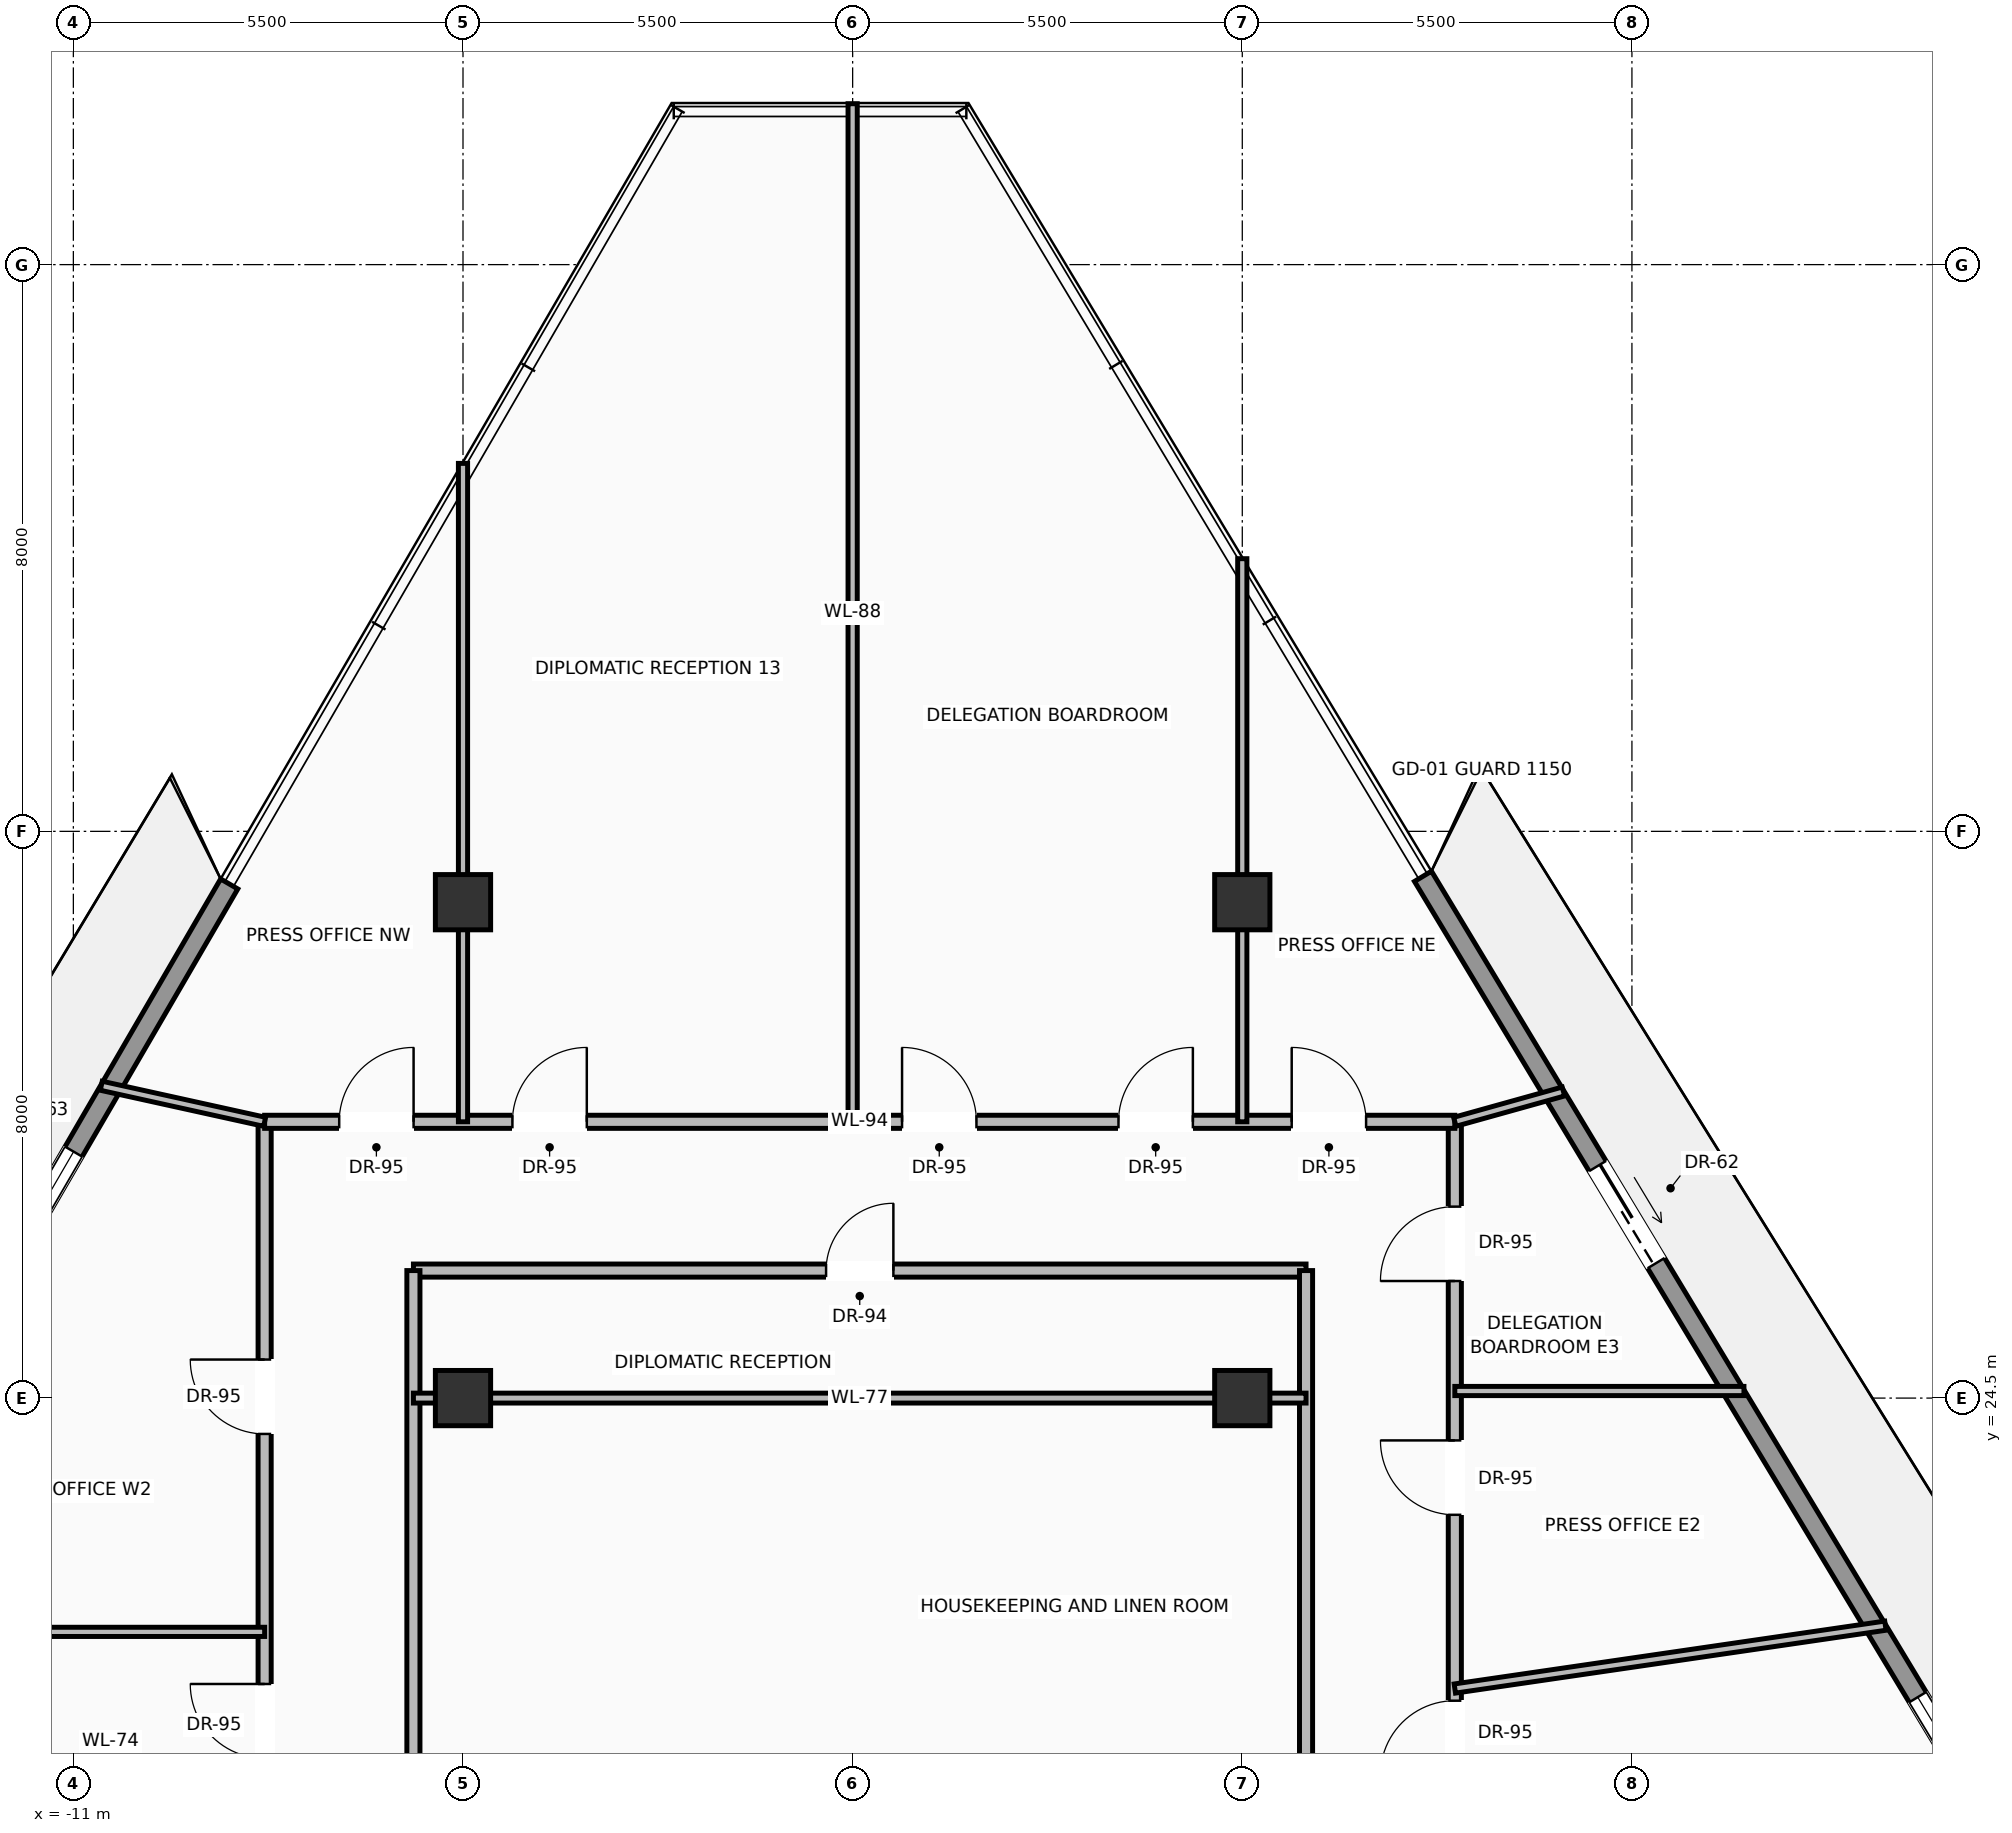
"""IFC4 building model, lengths in metres.
Left out: names, types, materials, properties, quantities, classifications, styles, units other than length and angle.
Written with IfcOpenShell. Run it as: python <this file> out.ifc"""

import sys

from ifc_helpers import new_model, si_unit, direction, frame, frame_2d, origin, origin_2d, place, context, subcontext, project, spatial, rectangle, extrude, source, transform, mapped, element, fill, save


model = new_model("IFC4")
c1 = context("Model", 3, precision=1e-05, world=origin(), true_north=direction((0.0, 1.0)))
c2 = subcontext(c1, "Body", "Model", "MODEL_VIEW")
j1 = project(units=[si_unit("LENGTHUNIT", "METRE"), si_unit("PLANEANGLEUNIT", "RADIAN")], contexts=[c1])
p1 = place(None, origin())
s1 = spatial("IfcSite", under=j1, at=p1, CompositionType="ELEMENT")
p2 = place(p1, origin())
s2 = spatial("IfcBuilding", under=s1, at=p2, CompositionType="ELEMENT")
p3 = place(p2, frame((0.0, 0.0, 262.65)))
s3 = spatial("IfcBuildingStorey", under=s2, at=p3, CompositionType="ELEMENT", Elevation=262.65)
m1 = source(origin(), c2, "Body", "SweptSolid", [
    extrude(rectangle(XDim=0.78, YDim=0.78, at=origin_2d()), origin(), (0.0, 0.0, 1.0), 3.45),
])
for number, where, z_axis, x_axis in (
    (1, (-5.5, 24.5, 0.0), (0.0, 0.0, 1.0), (1.0, 0.0, 0.0)),
    (2, (5.5, 24.5, 0.0), (0.0, 0.0, 1.0), (1.0, 0.0, 0.0)),
    (3, (-5.5, 31.5, 0.0), (0.0, 0.0, 1.0), (1.0, 0.0, 0.0)),
    (4, (5.5, 31.5, 0.0), (0.0, 0.0, 1.0), (1.0, 0.0, 0.0)),
):
    element("IfcColumn", number, at=place(p3, frame(where, z_axis=z_axis, x_axis=x_axis)), inside=s3, PredefinedType="COLUMN", context=c2, shape_type="MappedRepresentation", body=[
        mapped(m1, transform((0.0, 0.0, 0.0), scale=1.0)),
    ])
p4 = place(p3, frame((-18.804, 14.545, 0.0), z_axis=(0.0, 0.0, 1.0), x_axis=(0.502487235879, 0.864584627309, 0.0)))
e5 = element("IfcWall", 5, at=p4, inside=s3, PredefinedType="SOLIDWALL", context=c2, shape_type="SweptSolid", body=[
    extrude(rectangle(XDim=19.908, YDim=0.28, at=frame_2d((9.954, 0.0))), origin(), (0.0, 0.0, 1.0), 2.82),
])
p5 = place(p4, frame((4.778, 0.0, 0.0)))
e6 = element("IfcOpeningElement", 6, at=p5, cuts=e5, PredefinedType="OPENING", context=c2, shape_type="SweptSolid", body=[
    extrude(rectangle(XDim=1.6, YDim=2.35, at=frame_2d((0.8, 1.175))), frame((0.0, 0.15, 0.0), z_axis=(0.0, -1.0, 0.0), x_axis=(1.0, 0.0, 0.0)), (0.0, 0.0, 1.0), 0.3),
])
p6 = place(p4, frame((13.538, 0.0, 0.9)))
e7 = element("IfcOpeningElement", 7, at=p6, cuts=e5, PredefinedType="OPENING", context=c2, shape_type="SweptSolid", body=[
    extrude(rectangle(XDim=2.0, YDim=1.75, at=frame_2d((1.0, 0.875))), frame((0.0, 0.15, 0.0), z_axis=(0.0, -1.0, 0.0), x_axis=(1.0, 0.0, 0.0)), (0.0, 0.0, 1.0), 0.3),
])
p7 = place(p3, frame((8.051, 31.865, 0.0), z_axis=(0.0, 0.0, 1.0), x_axis=(0.516203649231, -0.856465873529, 0.0)))
e8 = element("IfcWall", 8, at=p7, inside=s3, PredefinedType="SOLIDWALL", context=c2, shape_type="SweptSolid", body=[
    extrude(rectangle(XDim=19.896, YDim=0.28, at=frame_2d((9.948, 0.0))), origin(), (0.0, 0.0, 1.0), 2.82),
])
p8 = place(p7, frame((4.775, 0.0, 0.0)))
e9 = element("IfcOpeningElement", 9, at=p8, cuts=e8, PredefinedType="OPENING", context=c2, shape_type="SweptSolid", body=[
    extrude(rectangle(XDim=1.6, YDim=2.35, at=frame_2d((0.8, 1.175))), frame((0.0, 0.15, 0.0), z_axis=(0.0, -1.0, 0.0), x_axis=(1.0, 0.0, 0.0)), (0.0, 0.0, 1.0), 0.3),
])
p9 = place(p7, frame((13.529, 0.0, 0.9)))
e10 = element("IfcOpeningElement", 10, at=p9, cuts=e8, PredefinedType="OPENING", context=c2, shape_type="SweptSolid", body=[
    extrude(rectangle(XDim=2.0, YDim=1.75, at=frame_2d((1.0, 0.875))), frame((0.0, 0.15, 0.0), z_axis=(0.0, -1.0, 0.0), x_axis=(1.0, 0.0, 0.0)), (0.0, 0.0, 1.0), 0.3),
])
p10 = place(p3, frame((-6.2, 26.3, 0.0), z_axis=(0.0, 0.0, 1.0), x_axis=(1.0, 0.0, 0.0)))
e11 = element("IfcWall", 11, at=p10, inside=s3, PredefinedType="PARTITIONING", context=c2, shape_type="SweptSolid", body=[
    extrude(rectangle(XDim=12.6, YDim=0.185, at=frame_2d((6.3, 0.0))), origin(), (0.0, 0.0, 1.0), 3.232),
])
p11 = place(p10, frame((5.825, 0.0, 0.0)))
e12 = element("IfcOpeningElement", 12, at=p11, cuts=e11, PredefinedType="OPENING", context=c2, shape_type="SweptSolid", body=[
    extrude(rectangle(XDim=0.95, YDim=2.2, at=frame_2d((0.475, 1.1))), frame((0.0, 0.103, 0.0), z_axis=(0.0, -1.0, 0.0), x_axis=(1.0, 0.0, 0.0)), (0.0, 0.0, 1.0), 0.205),
])
for number, where, z_axis, x_axis in (
    (13, (-6.2, 18.4, 0.0), (0.0, 0.0, 1.0), (0.0, 1.0, 0.0)),
    (14, (6.4, 18.4, 0.0), (0.0, 0.0, 1.0), (0.0, 1.0, 0.0)),
):
    element("IfcWall", number, at=place(p3, frame(where, z_axis=z_axis, x_axis=x_axis)), inside=s3, PredefinedType="PARTITIONING", context=c2, shape_type="SweptSolid", body=[
        extrude(rectangle(XDim=7.9, YDim=0.185, at=frame_2d((3.95, 0.0))), origin(), (0.0, 0.0, 1.0), 3.232),
    ])
p12 = place(p3, frame((-8.3, 16.2, 0.0), z_axis=(0.0, 0.0, 1.0), x_axis=(0.0, 1.0, 0.0)))
e15 = element("IfcWall", 15, at=p12, inside=s3, PredefinedType="PARTITIONING", context=c2, shape_type="SweptSolid", body=[
    extrude(rectangle(XDim=12.2, YDim=0.185, at=frame_2d((6.1, 0.0))), origin(), (0.0, 0.0, 1.0), 3.232),
])
p13 = place(p12, frame((3.214, 0.0, 0.0)))
e16 = element("IfcOpeningElement", 16, at=p13, cuts=e15, PredefinedType="OPENING", context=c2, shape_type="SweptSolid", body=[
    extrude(rectangle(XDim=1.05, YDim=2.25, at=frame_2d((0.525, 1.125))), frame((0.0, 0.103, 0.0), z_axis=(0.0, -1.0, 0.0), x_axis=(1.0, 0.0, 0.0)), (0.0, 0.0, 1.0), 0.205),
])
p14 = place(p12, frame((7.794, 0.0, 0.0)))
e17 = element("IfcOpeningElement", 17, at=p14, cuts=e15, PredefinedType="OPENING", context=c2, shape_type="SweptSolid", body=[
    extrude(rectangle(XDim=1.05, YDim=2.25, at=frame_2d((0.525, 1.125))), frame((0.0, 0.103, 0.0), z_axis=(0.0, -1.0, 0.0), x_axis=(1.0, 0.0, 0.0)), (0.0, 0.0, 1.0), 0.205),
])
p15 = place(p3, frame((8.5, 16.2, 0.0), z_axis=(0.0, 0.0, 1.0), x_axis=(0.0, 1.0, 0.0)))
e18 = element("IfcWall", 18, at=p15, inside=s3, PredefinedType="PARTITIONING", context=c2, shape_type="SweptSolid", body=[
    extrude(rectangle(XDim=12.2, YDim=0.185, at=frame_2d((6.1, 0.0))), origin(), (0.0, 0.0, 1.0), 3.232),
])
p16 = place(p15, frame((2.978, 0.0, 0.0)))
e19 = element("IfcOpeningElement", 19, at=p16, cuts=e18, PredefinedType="OPENING", context=c2, shape_type="SweptSolid", body=[
    extrude(rectangle(XDim=1.05, YDim=2.25, at=frame_2d((0.525, 1.125))), frame((0.0, 0.103, 0.0), z_axis=(0.0, -1.0, 0.0), x_axis=(1.0, 0.0, 0.0)), (0.0, 0.0, 1.0), 0.205),
])
p17 = place(p15, frame((6.653, 0.0, 0.0)))
e20 = element("IfcOpeningElement", 20, at=p17, cuts=e18, PredefinedType="OPENING", context=c2, shape_type="SweptSolid", body=[
    extrude(rectangle(XDim=1.05, YDim=2.25, at=frame_2d((0.525, 1.125))), frame((0.0, 0.103, 0.0), z_axis=(0.0, -1.0, 0.0), x_axis=(1.0, 0.0, 0.0)), (0.0, 0.0, 1.0), 0.205),
])
p18 = place(p15, frame((9.953, 0.0, 0.0)))
e21 = element("IfcOpeningElement", 21, at=p18, cuts=e18, PredefinedType="OPENING", context=c2, shape_type="SweptSolid", body=[
    extrude(rectangle(XDim=1.05, YDim=2.25, at=frame_2d((0.525, 1.125))), frame((0.0, 0.103, 0.0), z_axis=(0.0, -1.0, 0.0), x_axis=(1.0, 0.0, 0.0)), (0.0, 0.0, 1.0), 0.205),
])
p19 = place(p3, frame((-8.3, 28.4, 0.0), z_axis=(0.0, 0.0, 1.0), x_axis=(1.0, 0.0, 0.0)))
e22 = element("IfcWall", 22, at=p19, inside=s3, PredefinedType="PARTITIONING", context=c2, shape_type="SweptSolid", body=[
    extrude(rectangle(XDim=16.8, YDim=0.185, at=frame_2d((8.4, 0.0))), origin(), (0.0, 0.0, 1.0), 3.232),
])
p20 = place(p19, frame((3.498, 0.0, 0.0)))
e23 = element("IfcOpeningElement", 23, at=p20, cuts=e22, PredefinedType="OPENING", context=c2, shape_type="SweptSolid", body=[
    extrude(rectangle(XDim=1.05, YDim=2.25, at=frame_2d((0.525, 1.125))), frame((0.0, 0.103, 0.0), z_axis=(0.0, -1.0, 0.0), x_axis=(1.0, 0.0, 0.0)), (0.0, 0.0, 1.0), 0.205),
])
p21 = place(p19, frame((8.998, 0.0, 0.0)))
e24 = element("IfcOpeningElement", 24, at=p21, cuts=e22, PredefinedType="OPENING", context=c2, shape_type="SweptSolid", body=[
    extrude(rectangle(XDim=1.05, YDim=2.25, at=frame_2d((0.525, 1.125))), frame((0.0, 0.103, 0.0), z_axis=(0.0, -1.0, 0.0), x_axis=(1.0, 0.0, 0.0)), (0.0, 0.0, 1.0), 0.205),
])
p22 = place(p19, frame((12.052, 0.0, 0.0)))
e25 = element("IfcOpeningElement", 25, at=p22, cuts=e22, PredefinedType="OPENING", context=c2, shape_type="SweptSolid", body=[
    extrude(rectangle(XDim=1.05, YDim=2.25, at=frame_2d((0.525, 1.125))), frame((0.0, 0.103, 0.0), z_axis=(0.0, -1.0, 0.0), x_axis=(1.0, 0.0, 0.0)), (0.0, 0.0, 1.0), 0.205),
])
p23 = place(p19, frame((14.498, 0.0, 0.0)))
e26 = element("IfcOpeningElement", 26, at=p23, cuts=e22, PredefinedType="OPENING", context=c2, shape_type="SweptSolid", body=[
    extrude(rectangle(XDim=1.05, YDim=2.25, at=frame_2d((0.525, 1.125))), frame((0.0, 0.103, 0.0), z_axis=(0.0, -1.0, 0.0), x_axis=(1.0, 0.0, 0.0)), (0.0, 0.0, 1.0), 0.205),
])
p24 = place(p19, frame((1.052, 0.0, 0.0)))
e27 = element("IfcOpeningElement", 27, at=p24, cuts=e22, PredefinedType="OPENING", context=c2, shape_type="SweptSolid", body=[
    extrude(rectangle(XDim=1.05, YDim=2.25, at=frame_2d((0.525, 1.125))), frame((0.0, 0.103, 0.0), z_axis=(0.0, -1.0, 0.0), x_axis=(1.0, 0.0, 0.0)), (0.0, 0.0, 1.0), 0.205),
])
p25 = place(p3, frame((-6.2, 24.5, 0.0), z_axis=(0.0, 0.0, 1.0), x_axis=(1.0, 0.0, 0.0)))
e28 = element("IfcWall", 28, at=p25, inside=s3, PredefinedType="PARTITIONING", context=c2, shape_type="SweptSolid", body=[
    extrude(rectangle(XDim=12.6, YDim=0.14, at=frame_2d((6.3, 0.0))), origin(), (0.0, 0.0, 1.0), 2.683),
])
p26 = place(p3, frame((-10.606, 28.909, 0.0), z_axis=(0.0, 0.0, 1.0), x_axis=(0.976516737467, -0.215441549956, 0.0)))
e29 = element("IfcWall", 29, at=p26, inside=s3, PredefinedType="PARTITIONING", context=c2, shape_type="SweptSolid", body=[
    extrude(rectangle(XDim=2.362, YDim=0.13, at=frame_2d((1.181, 0.0))), origin(), (0.0, 0.0, 1.0), 3.232),
])
p27 = place(p3, frame((8.5, 28.4, 0.0), z_axis=(0.0, 0.0, 1.0), x_axis=(0.963218462171, 0.268719545497, 0.0)))
e30 = element("IfcWall", 30, at=p27, inside=s3, PredefinedType="PARTITIONING", context=c2, shape_type="SweptSolid", body=[
    extrude(rectangle(XDim=1.592, YDim=0.13, at=frame_2d((0.796, 0.0))), origin(), (0.0, 0.0, 1.0), 3.232),
])
p28 = place(p3, frame((-5.5, 28.4, 0.0), z_axis=(0.0, 0.0, 1.0), x_axis=(0.0, 1.0, 0.0)))
e31 = element("IfcWall", 31, at=p28, inside=s3, PredefinedType="PARTITIONING", context=c2, shape_type="SweptSolid", body=[
    extrude(rectangle(XDim=9.294, YDim=0.13, at=frame_2d((4.647, 0.0))), origin(), (0.0, 0.0, 1.0), 2.683),
])
p29 = place(p3, frame((5.5, 28.4, 0.0), z_axis=(0.0, 0.0, 1.0), x_axis=(0.0, 1.0, 0.0)))
e32 = element("IfcWall", 32, at=p29, inside=s3, PredefinedType="PARTITIONING", context=c2, shape_type="SweptSolid", body=[
    extrude(rectangle(XDim=7.949, YDim=0.13, at=frame_2d((3.975, 0.0))), origin(), (0.0, 0.0, 1.0), 2.683),
])
p30 = place(p3, frame((0.0, 28.4, 0.0), z_axis=(0.0, 0.0, 1.0), x_axis=(0.0, 1.0, 0.0)))
e33 = element("IfcWall", 33, at=p30, inside=s3, PredefinedType="PARTITIONING", context=c2, shape_type="SweptSolid", body=[
    extrude(rectangle(XDim=14.371, YDim=0.13, at=frame_2d((7.186, 0.0))), origin(), (0.0, 0.0, 1.0), 3.232),
])
p31 = place(p3, frame((-15.086, 21.2, 0.0), z_axis=(0.0, 0.0, 1.0), x_axis=(1.0, 0.0, 0.0)))
e34 = element("IfcWall", 34, at=p31, inside=s3, PredefinedType="PARTITIONING", context=c2, shape_type="SweptSolid", body=[
    extrude(rectangle(XDim=6.786, YDim=0.13, at=frame_2d((3.393, 0.0))), origin(), (0.0, 0.0, 1.0), 3.232),
])
p32 = place(p3, frame((8.5, 20.4, 0.0), z_axis=(0.0, 0.0, 1.0), x_axis=(0.989507543015, 0.144481217869, 0.0)))
e35 = element("IfcWall", 35, at=p32, inside=s3, PredefinedType="PARTITIONING", context=c2, shape_type="SweptSolid", body=[
    extrude(rectangle(XDim=6.142, YDim=0.13, at=frame_2d((3.071, 0.0))), origin(), (0.0, 0.0, 1.0), 3.232),
])
p33 = place(p3, frame((8.5, 24.6, 0.0), z_axis=(0.0, 0.0, 1.0), x_axis=(1.0, 0.0, 0.0)))
e36 = element("IfcWall", 36, at=p33, inside=s3, PredefinedType="PARTITIONING", context=c2, shape_type="SweptSolid", body=[
    extrude(rectangle(XDim=4.081, YDim=0.13, at=frame_2d((2.041, 0.0))), origin(), (0.0, 0.0, 1.0), 2.683),
])
m2 = source(origin(), c2, "Body", "SweptSolid", [
    extrude(rectangle(XDim=2.0, YDim=1.75, at=frame_2d((1.0, 0.875))), frame((0.0, 0.03, 0.0), z_axis=(0.0, -1.0, 0.0), x_axis=(1.0, 0.0, 0.0)), (0.0, 0.0, 1.0), 0.06),
])
p34 = place(p6, origin())
e37 = element("IfcWindow", 37, at=p34, inside=s3, PartitioningType="SINGLE_PANEL", PredefinedType="WINDOW", context=c2, shape_type="MappedRepresentation", body=[
    mapped(m2, transform((0.0, 0.0, 0.0), scale=1.0)),
])
fill(e7, e37)
m3 = source(origin(), c2, "Body", "SweptSolid", [
    extrude(rectangle(XDim=1.6, YDim=2.35, at=frame_2d((0.8, 1.175))), frame((0.0, 0.025, 0.0), z_axis=(0.0, -1.0, 0.0), x_axis=(1.0, 0.0, 0.0)), (0.0, 0.0, 1.0), 0.05),
])
p35 = place(p8, origin())
e38 = element("IfcDoor", 38, at=p35, inside=s3, OperationType="SLIDING_TO_RIGHT", PredefinedType="DOOR", context=c2, shape_type="MappedRepresentation", body=[
    mapped(m3, transform((0.0, 0.0, 0.0), scale=1.0)),
])
fill(e9, e38)
p36 = place(p9, origin())
e39 = element("IfcWindow", 39, at=p36, inside=s3, PartitioningType="SINGLE_PANEL", PredefinedType="WINDOW", context=c2, shape_type="MappedRepresentation", body=[
    mapped(m2, transform((0.0, 0.0, 0.0), scale=1.0)),
])
fill(e10, e39)
m4 = source(origin(), c2, "Body", "SweptSolid", [
    extrude(rectangle(XDim=0.95, YDim=2.2, at=frame_2d((0.475, 1.1))), frame((0.0, 0.025, 0.0), z_axis=(0.0, -1.0, 0.0), x_axis=(1.0, 0.0, 0.0)), (0.0, 0.0, 1.0), 0.05),
])
p37 = place(p11, origin())
e40 = element("IfcDoor", 40, at=p37, inside=s3, OperationType="SINGLE_SWING_RIGHT", PredefinedType="DOOR", context=c2, shape_type="MappedRepresentation", body=[
    mapped(m4, transform((0.0, 0.0, 0.0), scale=1.0)),
])
fill(e12, e40)
m5 = source(origin(), c2, "Body", "SweptSolid", [
    extrude(rectangle(XDim=1.05, YDim=2.25, at=frame_2d((0.525, 1.125))), frame((0.0, 0.025, 0.0), z_axis=(0.0, -1.0, 0.0), x_axis=(1.0, 0.0, 0.0)), (0.0, 0.0, 1.0), 0.05),
])
p38 = place(p13, origin())
e41 = element("IfcDoor", 41, at=p38, inside=s3, OperationType="SINGLE_SWING_RIGHT", PredefinedType="DOOR", context=c2, shape_type="MappedRepresentation", body=[
    mapped(m5, transform((0.0, 0.0, 0.0), scale=1.0)),
])
fill(e16, e41)
p39 = place(p14, origin())
e42 = element("IfcDoor", 42, at=p39, inside=s3, OperationType="SINGLE_SWING_RIGHT", PredefinedType="DOOR", context=c2, shape_type="MappedRepresentation", body=[
    mapped(m5, transform((0.0, 0.0, 0.0), scale=1.0)),
])
fill(e17, e42)
p40 = place(p16, origin())
e43 = element("IfcDoor", 43, at=p40, inside=s3, OperationType="SINGLE_SWING_LEFT", PredefinedType="DOOR", context=c2, shape_type="MappedRepresentation", body=[
    mapped(m5, transform((0.0, 0.0, 0.0), scale=1.0)),
])
fill(e19, e43)
p41 = place(p17, origin())
e44 = element("IfcDoor", 44, at=p41, inside=s3, OperationType="SINGLE_SWING_RIGHT", PredefinedType="DOOR", context=c2, shape_type="MappedRepresentation", body=[
    mapped(m5, transform((0.0, 0.0, 0.0), scale=1.0)),
])
fill(e20, e44)
p42 = place(p18, origin())
e45 = element("IfcDoor", 45, at=p42, inside=s3, OperationType="SINGLE_SWING_LEFT", PredefinedType="DOOR", context=c2, shape_type="MappedRepresentation", body=[
    mapped(m5, transform((0.0, 0.0, 0.0), scale=1.0)),
])
fill(e21, e45)
p43 = place(p20, origin())
e46 = element("IfcDoor", 46, at=p43, inside=s3, OperationType="SINGLE_SWING_RIGHT", PredefinedType="DOOR", context=c2, shape_type="MappedRepresentation", body=[
    mapped(m5, transform((0.0, 0.0, 0.0), scale=1.0)),
])
fill(e23, e46)
p44 = place(p21, origin())
e47 = element("IfcDoor", 47, at=p44, inside=s3, OperationType="SINGLE_SWING_LEFT", PredefinedType="DOOR", context=c2, shape_type="MappedRepresentation", body=[
    mapped(m5, transform((0.0, 0.0, 0.0), scale=1.0)),
])
fill(e24, e47)
p45 = place(p22, origin())
e48 = element("IfcDoor", 48, at=p45, inside=s3, OperationType="SINGLE_SWING_RIGHT", PredefinedType="DOOR", context=c2, shape_type="MappedRepresentation", body=[
    mapped(m5, transform((0.0, 0.0, 0.0), scale=1.0)),
])
fill(e25, e48)
p46 = place(p23, origin())
e49 = element("IfcDoor", 49, at=p46, inside=s3, OperationType="SINGLE_SWING_LEFT", PredefinedType="DOOR", context=c2, shape_type="MappedRepresentation", body=[
    mapped(m5, transform((0.0, 0.0, 0.0), scale=1.0)),
])
fill(e26, e49)
p47 = place(p24, origin())
e50 = element("IfcDoor", 50, at=p47, inside=s3, OperationType="SINGLE_SWING_RIGHT", PredefinedType="DOOR", context=c2, shape_type="MappedRepresentation", body=[
    mapped(m5, transform((0.0, 0.0, 0.0), scale=1.0)),
])
fill(e27, e50)
save(model, sys.argv[1])
